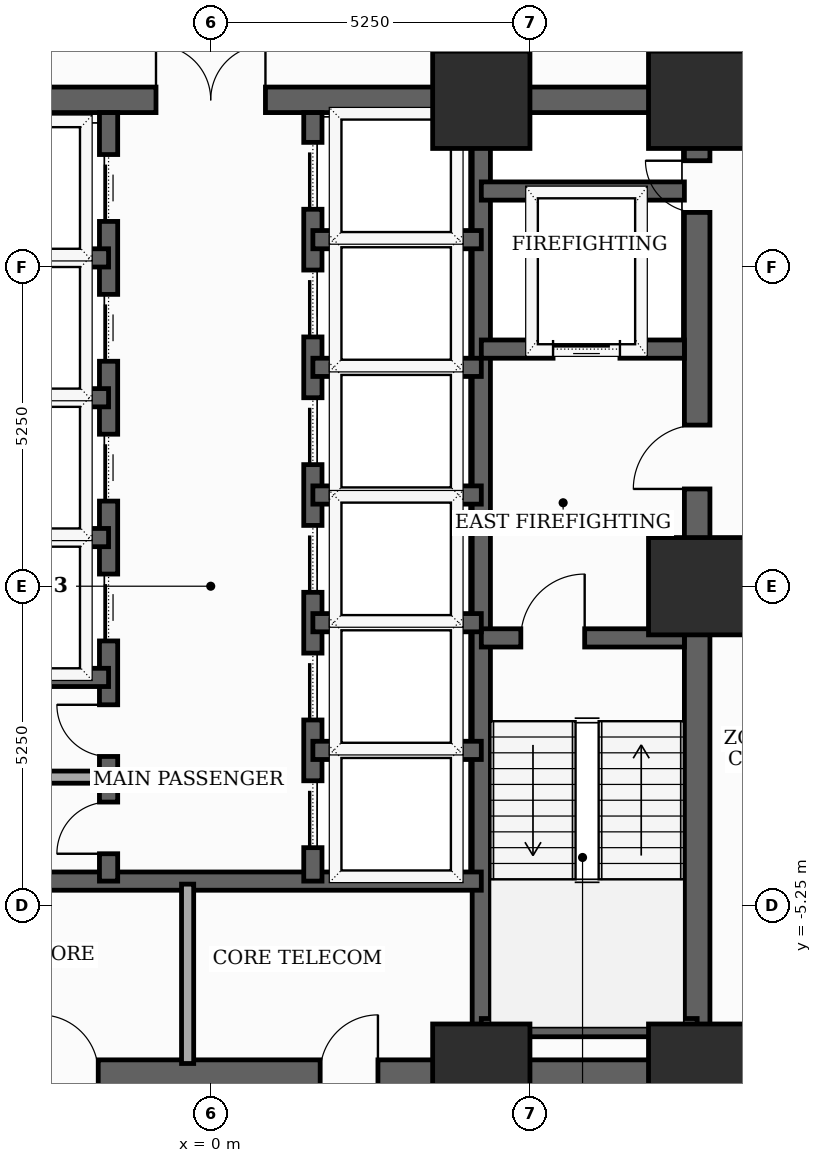
"""IFC4 building model, lengths in metres.
Left out: names, types, materials, properties, quantities, classifications, styles, units other than length and angle.
Written with IfcOpenShell. Run it as: python <this file> out.ifc"""

import sys

from ifc_helpers import new_model, si_unit, direction, frame, frame_2d, origin, origin_2d, place, context, subcontext, project, spatial, rectangle, extrude, element, fill, save


model = new_model("IFC4")
c1 = context("Model", 3, precision=1e-05, world=origin(), true_north=direction((0.0, 1.0)))
c2 = subcontext(c1, "Body", "Model", "MODEL_VIEW")
j1 = project(units=[si_unit("LENGTHUNIT", "METRE"), si_unit("PLANEANGLEUNIT", "RADIAN")], contexts=[c1])
p1 = place(None, origin())
s1 = spatial("IfcSite", under=j1, at=p1, CompositionType="ELEMENT")
p2 = place(p1, origin())
s2 = spatial("IfcBuilding", under=s1, at=p2, CompositionType="ELEMENT")
p3 = place(p2, frame((0.0, 0.0, 33.4)))
s3 = spatial("IfcBuildingStorey", under=s2, at=p3, CompositionType="ELEMENT", Elevation=33.4)
for number, where, z_axis, x_axis in (
    (1, (4.45, -8.0, 0.0), (0.0, 0.0, 1.0), (1.0, 0.0, 0.0)),
    (2, (8.0, -8.0, 0.0), (0.0, 0.0, 1.0), (1.0, 0.0, 0.0)),
    (3, (8.0, 0.0, 0.0), (0.0, 0.0, 1.0), (1.0, 0.0, 0.0)),
    (4, (8.0, 8.0, 0.0), (0.0, 0.0, 1.0), (1.0, 0.0, 0.0)),
    (5, (4.45, 8.0, 0.0), (0.0, 0.0, 1.0), (1.0, 0.0, 0.0)),
):
    element("IfcColumn", number, at=place(p3, frame(where, z_axis=z_axis, x_axis=x_axis)), inside=s3, PredefinedType="COLUMN", context=c2, shape_type="SweptSolid", body=[
        extrude(rectangle(XDim=1.6, YDim=1.6, at=origin_2d()), origin(), (0.0, 0.0, 1.0), 3.7),
    ])
p4 = place(p3, frame((8.0, -8.0, 0.0), z_axis=(0.0, 0.0, 1.0), x_axis=(0.0, 1.0, 0.0)))
e6 = element("IfcWall", 6, at=p4, inside=s3, PredefinedType="SHEAR", context=c2, shape_type="SweptSolid", body=[
    extrude(rectangle(XDim=16.0, YDim=0.42, at=frame_2d((8.0, 0.0))), origin(), (0.0, 0.0, 1.0), 3.5),
])
p5 = place(p4, frame((9.6, 0.0, 0.0)))
e7 = element("IfcOpeningElement", 7, at=p5, cuts=e6, PredefinedType="OPENING", context=c2, shape_type="SweptSolid", body=[
    extrude(rectangle(XDim=1.05, YDim=2.15, at=frame_2d((0.525, 1.075))), frame((0.0, 0.22, 0.0), z_axis=(0.0, -1.0, 0.0), x_axis=(1.0, 0.0, 0.0)), (0.0, 0.0, 1.0), 0.44),
])
p6 = place(p4, frame((14.148, 0.0, 0.0)))
e8 = element("IfcOpeningElement", 8, at=p6, cuts=e6, PredefinedType="OPENING", context=c2, shape_type="SweptSolid", body=[
    extrude(rectangle(XDim=0.85, YDim=2.02, at=frame_2d((0.425, 1.01))), frame((0.0, 0.22, 0.0), z_axis=(0.0, -1.0, 0.0), x_axis=(1.0, 0.0, 0.0)), (0.0, 0.0, 1.0), 0.44),
])
p7 = place(p3, frame((-8.0, -8.0, 0.0), z_axis=(0.0, 0.0, 1.0), x_axis=(1.0, 0.0, 0.0)))
e9 = element("IfcWall", 9, at=p7, inside=s3, PredefinedType="SHEAR", context=c2, shape_type="SweptSolid", body=[
    extrude(rectangle(XDim=16.0, YDim=0.42, at=frame_2d((8.0, 0.0))), origin(), (0.0, 0.0, 1.0), 3.5),
])
p8 = place(p7, frame((5.2, 0.0, 0.0)))
e10 = element("IfcOpeningElement", 10, at=p8, cuts=e9, PredefinedType="OPENING", context=c2, shape_type="SweptSolid", body=[
    extrude(rectangle(XDim=0.95, YDim=2.1, at=frame_2d((0.475, 1.05))), frame((0.0, 0.22, 0.0), z_axis=(0.0, -1.0, 0.0), x_axis=(1.0, 0.0, 0.0)), (0.0, 0.0, 1.0), 0.44),
])
p9 = place(p7, frame((9.8, 0.0, 0.0)))
e11 = element("IfcOpeningElement", 11, at=p9, cuts=e9, PredefinedType="OPENING", context=c2, shape_type="SweptSolid", body=[
    extrude(rectangle(XDim=0.95, YDim=2.1, at=frame_2d((0.475, 1.05))), frame((0.0, 0.22, 0.0), z_axis=(0.0, -1.0, 0.0), x_axis=(1.0, 0.0, 0.0)), (0.0, 0.0, 1.0), 0.44),
])
p10 = place(p3, frame((-8.0, 8.0, 0.0), z_axis=(0.0, 0.0, 1.0), x_axis=(1.0, 0.0, 0.0)))
e12 = element("IfcWall", 12, at=p10, inside=s3, PredefinedType="SHEAR", context=c2, shape_type="SweptSolid", body=[
    extrude(rectangle(XDim=16.0, YDim=0.42, at=frame_2d((8.0, 0.0))), origin(), (0.0, 0.0, 1.0), 3.5),
])
p11 = place(p10, frame((7.1, 0.0, 0.0)))
e13 = element("IfcOpeningElement", 13, at=p11, cuts=e12, PredefinedType="OPENING", context=c2, shape_type="SweptSolid", body=[
    extrude(rectangle(XDim=1.8, YDim=2.15, at=frame_2d((0.9, 1.075))), frame((0.0, 0.22, 0.0), z_axis=(0.0, -1.0, 0.0), x_axis=(1.0, 0.0, 0.0)), (0.0, 0.0, 1.0), 0.44),
])
p12 = place(p3, frame((4.45, -7.79, 0.0), z_axis=(0.0, 0.0, 1.0), x_axis=(0.0, 1.0, 0.0)))
e14 = element("IfcWall", 14, at=p12, inside=s3, PredefinedType="SHEAR", context=c2, shape_type="SweptSolid", body=[
    extrude(rectangle(XDim=15.58, YDim=0.3, at=frame_2d((7.79, 0.0))), origin(), (0.0, 0.0, 1.0), 3.5),
])
p13 = place(p3, frame((4.45, -0.85, 0.0), z_axis=(0.0, 0.0, 1.0), x_axis=(1.0, 0.0, 0.0)))
e15 = element("IfcWall", 15, at=p13, inside=s3, PredefinedType="SHEAR", context=c2, shape_type="SweptSolid", body=[
    extrude(rectangle(XDim=3.34, YDim=0.3, at=frame_2d((1.67, 0.0))), origin(), (0.0, 0.0, 1.0), 3.5),
])
p14 = place(p13, frame((0.65, 0.0, 0.0)))
e16 = element("IfcOpeningElement", 16, at=p14, cuts=e15, PredefinedType="OPENING", context=c2, shape_type="SweptSolid", body=[
    extrude(rectangle(XDim=1.05, YDim=2.15, at=frame_2d((0.525, 1.075))), frame((0.0, 0.16, 0.0), z_axis=(0.0, -1.0, 0.0), x_axis=(1.0, 0.0, 0.0)), (0.0, 0.0, 1.0), 0.32),
])
p15 = place(p3, frame((4.45, -7.26, 0.0), z_axis=(0.0, 0.0, 1.0), x_axis=(1.0, 0.0, 0.0)))
e17 = element("IfcWall", 17, at=p15, inside=s3, PredefinedType="SHEAR", context=c2, shape_type="SweptSolid", body=[
    extrude(rectangle(XDim=3.55, YDim=0.3, at=frame_2d((1.775, 0.0))), origin(), (0.0, 0.0, 1.0), 3.5),
])
p16 = place(p3, frame((4.45, 3.9, 0.0), z_axis=(0.0, 0.0, 1.0), x_axis=(1.0, 0.0, 0.0)))
e18 = element("IfcWall", 18, at=p16, inside=s3, PredefinedType="SHEAR", context=c2, shape_type="SweptSolid", body=[
    extrude(rectangle(XDim=3.34, YDim=0.3, at=frame_2d((1.67, 0.0))), origin(), (0.0, 0.0, 1.0), 3.5),
])
p17 = place(p16, frame((1.18, 0.0, 0.0)))
e19 = element("IfcOpeningElement", 19, at=p17, cuts=e18, PredefinedType="OPENING", context=c2, shape_type="SweptSolid", body=[
    extrude(rectangle(XDim=1.1, YDim=2.1, at=frame_2d((0.55, 1.05))), frame((0.0, 0.16, 0.0), z_axis=(0.0, -1.0, 0.0), x_axis=(1.0, 0.0, 0.0)), (0.0, 0.0, 1.0), 0.32),
])
p18 = place(p3, frame((4.45, 6.5, 0.0), z_axis=(0.0, 0.0, 1.0), x_axis=(1.0, 0.0, 0.0)))
e20 = element("IfcWall", 20, at=p18, inside=s3, PredefinedType="SHEAR", context=c2, shape_type="SweptSolid", body=[
    extrude(rectangle(XDim=3.34, YDim=0.3, at=frame_2d((1.67, 0.0))), origin(), (0.0, 0.0, 1.0), 3.5),
])
p19 = place(p3, frame((-4.45, -4.85, 0.0), z_axis=(0.0, 0.0, 1.0), x_axis=(1.0, 0.0, 0.0)))
e21 = element("IfcWall", 21, at=p19, inside=s3, PredefinedType="SHEAR", context=c2, shape_type="SweptSolid", body=[
    extrude(rectangle(XDim=8.9, YDim=0.3, at=frame_2d((4.45, 0.0))), origin(), (0.0, 0.0, 1.0), 3.5),
])
p20 = place(p3, frame((-1.68, -4.85, 0.0), z_axis=(0.0, 0.0, 1.0), x_axis=(0.0, 1.0, 0.0)))
e22 = element("IfcWall", 22, at=p20, inside=s3, PredefinedType="SHEAR", context=c2, shape_type="SweptSolid", body=[
    extrude(rectangle(XDim=12.64, YDim=0.3, at=frame_2d((6.32, 0.0))), origin(), (0.0, 0.0, 1.0), 3.5),
])
p21 = place(p20, frame((3.95, 0.0, 0.0)))
e23 = element("IfcOpeningElement", 23, at=p21, cuts=e22, PredefinedType="OPENING", context=c2, shape_type="SweptSolid", body=[
    extrude(rectangle(XDim=1.1, YDim=2.1, at=frame_2d((0.55, 1.05))), frame((0.0, 0.16, 0.0), z_axis=(0.0, -1.0, 0.0), x_axis=(1.0, 0.0, 0.0)), (0.0, 0.0, 1.0), 0.32),
])
p22 = place(p20, frame((6.25, 0.0, 0.0)))
e24 = element("IfcOpeningElement", 24, at=p22, cuts=e22, PredefinedType="OPENING", context=c2, shape_type="SweptSolid", body=[
    extrude(rectangle(XDim=1.1, YDim=2.1, at=frame_2d((0.55, 1.05))), frame((0.0, 0.16, 0.0), z_axis=(0.0, -1.0, 0.0), x_axis=(1.0, 0.0, 0.0)), (0.0, 0.0, 1.0), 0.32),
])
p23 = place(p20, frame((8.55, 0.0, 0.0)))
e25 = element("IfcOpeningElement", 25, at=p23, cuts=e22, PredefinedType="OPENING", context=c2, shape_type="SweptSolid", body=[
    extrude(rectangle(XDim=1.1, YDim=2.1, at=frame_2d((0.55, 1.05))), frame((0.0, 0.16, 0.0), z_axis=(0.0, -1.0, 0.0), x_axis=(1.0, 0.0, 0.0)), (0.0, 0.0, 1.0), 0.32),
])
p24 = place(p20, frame((10.85, 0.0, 0.0)))
e26 = element("IfcOpeningElement", 26, at=p24, cuts=e22, PredefinedType="OPENING", context=c2, shape_type="SweptSolid", body=[
    extrude(rectangle(XDim=1.1, YDim=2.1, at=frame_2d((0.55, 1.05))), frame((0.0, 0.16, 0.0), z_axis=(0.0, -1.0, 0.0), x_axis=(1.0, 0.0, 0.0)), (0.0, 0.0, 1.0), 0.32),
])
p25 = place(p20, frame((0.45, 0.0, 0.0)))
e27 = element("IfcOpeningElement", 27, at=p25, cuts=e22, PredefinedType="OPENING", context=c2, shape_type="SweptSolid", body=[
    extrude(rectangle(XDim=0.85, YDim=2.02, at=frame_2d((0.425, 1.01))), frame((0.0, 0.16, 0.0), z_axis=(0.0, -1.0, 0.0), x_axis=(1.0, 0.0, 0.0)), (0.0, 0.0, 1.0), 0.32),
])
p26 = place(p20, frame((2.05, 0.0, 0.0)))
e28 = element("IfcOpeningElement", 28, at=p26, cuts=e22, PredefinedType="OPENING", context=c2, shape_type="SweptSolid", body=[
    extrude(rectangle(XDim=0.85, YDim=2.02, at=frame_2d((0.425, 1.01))), frame((0.0, 0.16, 0.0), z_axis=(0.0, -1.0, 0.0), x_axis=(1.0, 0.0, 0.0)), (0.0, 0.0, 1.0), 0.32),
])
p27 = place(p3, frame((1.68, -4.85, 0.0), z_axis=(0.0, 0.0, 1.0), x_axis=(0.0, 1.0, 0.0)))
e29 = element("IfcWall", 29, at=p27, inside=s3, PredefinedType="SHEAR", context=c2, shape_type="SweptSolid", body=[
    extrude(rectangle(XDim=12.64, YDim=0.3, at=frame_2d((6.32, 0.0))), origin(), (0.0, 0.0, 1.0), 3.5),
])
p28 = place(p27, frame((0.55, 0.0, 0.0)))
e30 = element("IfcOpeningElement", 30, at=p28, cuts=e29, PredefinedType="OPENING", context=c2, shape_type="SweptSolid", body=[
    extrude(rectangle(XDim=1.1, YDim=2.1, at=frame_2d((0.55, 1.05))), frame((0.0, 0.16, 0.0), z_axis=(0.0, -1.0, 0.0), x_axis=(1.0, 0.0, 0.0)), (0.0, 0.0, 1.0), 0.32),
])
p29 = place(p27, frame((2.65, 0.0, 0.0)))
e31 = element("IfcOpeningElement", 31, at=p29, cuts=e29, PredefinedType="OPENING", context=c2, shape_type="SweptSolid", body=[
    extrude(rectangle(XDim=1.1, YDim=2.1, at=frame_2d((0.55, 1.05))), frame((0.0, 0.16, 0.0), z_axis=(0.0, -1.0, 0.0), x_axis=(1.0, 0.0, 0.0)), (0.0, 0.0, 1.0), 0.32),
])
p30 = place(p27, frame((4.75, 0.0, 0.0)))
e32 = element("IfcOpeningElement", 32, at=p30, cuts=e29, PredefinedType="OPENING", context=c2, shape_type="SweptSolid", body=[
    extrude(rectangle(XDim=1.1, YDim=2.1, at=frame_2d((0.55, 1.05))), frame((0.0, 0.16, 0.0), z_axis=(0.0, -1.0, 0.0), x_axis=(1.0, 0.0, 0.0)), (0.0, 0.0, 1.0), 0.32),
])
p31 = place(p27, frame((6.85, 0.0, 0.0)))
e33 = element("IfcOpeningElement", 33, at=p31, cuts=e29, PredefinedType="OPENING", context=c2, shape_type="SweptSolid", body=[
    extrude(rectangle(XDim=1.1, YDim=2.1, at=frame_2d((0.55, 1.05))), frame((0.0, 0.16, 0.0), z_axis=(0.0, -1.0, 0.0), x_axis=(1.0, 0.0, 0.0)), (0.0, 0.0, 1.0), 0.32),
])
p32 = place(p27, frame((8.95, 0.0, 0.0)))
e34 = element("IfcOpeningElement", 34, at=p32, cuts=e29, PredefinedType="OPENING", context=c2, shape_type="SweptSolid", body=[
    extrude(rectangle(XDim=1.1, YDim=2.1, at=frame_2d((0.55, 1.05))), frame((0.0, 0.16, 0.0), z_axis=(0.0, -1.0, 0.0), x_axis=(1.0, 0.0, 0.0)), (0.0, 0.0, 1.0), 0.32),
])
p33 = place(p27, frame((11.05, 0.0, 0.0)))
e35 = element("IfcOpeningElement", 35, at=p33, cuts=e29, PredefinedType="OPENING", context=c2, shape_type="SweptSolid", body=[
    extrude(rectangle(XDim=1.1, YDim=2.1, at=frame_2d((0.55, 1.05))), frame((0.0, 0.16, 0.0), z_axis=(0.0, -1.0, 0.0), x_axis=(1.0, 0.0, 0.0)), (0.0, 0.0, 1.0), 0.32),
])
for number, where, z_axis, x_axis in (
    (36, (-4.45, -1.5, 0.0), (0.0, 0.0, 1.0), (1.0, 0.0, 0.0)),
    (37, (-4.45, 0.8, 0.0), (0.0, 0.0, 1.0), (1.0, 0.0, 0.0)),
    (38, (-4.45, 3.1, 0.0), (0.0, 0.0, 1.0), (1.0, 0.0, 0.0)),
    (39, (-4.45, 5.4, 0.0), (0.0, 0.0, 1.0), (1.0, 0.0, 0.0)),
    (40, (1.68, 1.5, 0.0), (0.0, 0.0, 1.0), (1.0, 0.0, 0.0)),
    (41, (1.68, 3.6, 0.0), (0.0, 0.0, 1.0), (1.0, 0.0, 0.0)),
    (42, (1.68, 5.7, 0.0), (0.0, 0.0, 1.0), (1.0, 0.0, 0.0)),
    (43, (1.68, -2.7, 0.0), (0.0, 0.0, 1.0), (1.0, 0.0, 0.0)),
    (44, (1.68, -0.6, 0.0), (0.0, 0.0, 1.0), (1.0, 0.0, 0.0)),
):
    element("IfcWall", number, at=place(p3, frame(where, z_axis=z_axis, x_axis=x_axis)), inside=s3, PredefinedType="SHEAR", context=c2, shape_type="SweptSolid", body=[
        extrude(rectangle(XDim=2.77, YDim=0.3, at=frame_2d((1.385, 0.0))), origin(), (0.0, 0.0, 1.0), 3.5),
    ])
p34 = place(p3, frame((-0.38, -7.85, 0.0), z_axis=(0.0, 0.0, 1.0), x_axis=(0.0, 1.0, 0.0)))
e45 = element("IfcWall", 45, at=p34, inside=s3, PredefinedType="SOLIDWALL", context=c2, shape_type="SweptSolid", body=[
    extrude(rectangle(XDim=2.95, YDim=0.2, at=frame_2d((1.475, 0.0))), origin(), (0.0, 0.0, 1.0), 2.885),
])
p35 = place(p3, frame((-4.4, -3.14, 0.0), z_axis=(0.0, 0.0, 1.0), x_axis=(1.0, 0.0, 0.0)))
e46 = element("IfcWall", 46, at=p35, inside=s3, PredefinedType="SOLIDWALL", context=c2, shape_type="SweptSolid", body=[
    extrude(rectangle(XDim=2.68, YDim=0.2, at=frame_2d((1.34, 0.0))), origin(), (0.0, 0.0, 1.0), 3.5),
])
p36 = place(p5, origin())
e47 = element("IfcDoor", 47, at=p36, inside=s3, OperationType="SINGLE_SWING_LEFT", PredefinedType="DOOR", context=c2, shape_type="SweptSolid", body=[
    extrude(rectangle(XDim=1.05, YDim=2.15, at=frame_2d((0.525, 1.075))), frame((0.0, 0.025, 0.0), z_axis=(0.0, -1.0, 0.0), x_axis=(1.0, 0.0, 0.0)), (0.0, 0.0, 1.0), 0.05),
])
fill(e7, e47)
p37 = place(p6, origin())
e48 = element("IfcDoor", 48, at=p37, inside=s3, OperationType="SINGLE_SWING_RIGHT", PredefinedType="TRAPDOOR", context=c2, shape_type="SweptSolid", body=[
    extrude(rectangle(XDim=0.85, YDim=2.02, at=frame_2d((0.425, 1.01))), frame((0.0, 0.025, 0.0), z_axis=(0.0, -1.0, 0.0), x_axis=(1.0, 0.0, 0.0)), (0.0, 0.0, 1.0), 0.05),
])
fill(e8, e48)
p38 = place(p8, origin())
e49 = element("IfcDoor", 49, at=p38, inside=s3, OperationType="SINGLE_SWING_LEFT", PredefinedType="DOOR", context=c2, shape_type="SweptSolid", body=[
    extrude(rectangle(XDim=0.95, YDim=2.1, at=frame_2d((0.475, 1.05))), frame((0.0, 0.025, 0.0), z_axis=(0.0, -1.0, 0.0), x_axis=(1.0, 0.0, 0.0)), (0.0, 0.0, 1.0), 0.05),
])
fill(e10, e49)
p39 = place(p9, origin())
e50 = element("IfcDoor", 50, at=p39, inside=s3, OperationType="SINGLE_SWING_RIGHT", PredefinedType="DOOR", context=c2, shape_type="SweptSolid", body=[
    extrude(rectangle(XDim=0.95, YDim=2.1, at=frame_2d((0.475, 1.05))), frame((0.0, 0.025, 0.0), z_axis=(0.0, -1.0, 0.0), x_axis=(1.0, 0.0, 0.0)), (0.0, 0.0, 1.0), 0.05),
])
fill(e11, e50)
p40 = place(p11, origin())
e51 = element("IfcDoor", 51, at=p40, inside=s3, OperationType="DOUBLE_DOOR_SINGLE_SWING", PredefinedType="DOOR", context=c2, shape_type="SweptSolid", body=[
    extrude(rectangle(XDim=1.8, YDim=2.15, at=frame_2d((0.9, 1.075))), frame((0.0, 0.025, 0.0), z_axis=(0.0, -1.0, 0.0), x_axis=(1.0, 0.0, 0.0)), (0.0, 0.0, 1.0), 0.05),
])
fill(e13, e51)
p41 = place(p14, origin())
e52 = element("IfcDoor", 52, at=p41, inside=s3, OperationType="SINGLE_SWING_RIGHT", PredefinedType="DOOR", context=c2, shape_type="SweptSolid", body=[
    extrude(rectangle(XDim=1.05, YDim=2.15, at=frame_2d((0.525, 1.075))), frame((0.0, 0.025, 0.0), z_axis=(0.0, -1.0, 0.0), x_axis=(1.0, 0.0, 0.0)), (0.0, 0.0, 1.0), 0.05),
])
fill(e16, e52)
p42 = place(p17, origin())
e53 = element("IfcDoor", 53, at=p42, inside=s3, OperationType="SLIDING_TO_LEFT", PredefinedType="DOOR", context=c2, shape_type="SweptSolid", body=[
    extrude(rectangle(XDim=1.1, YDim=2.1, at=frame_2d((0.55, 1.05))), frame((0.0, 0.025, 0.0), z_axis=(0.0, -1.0, 0.0), x_axis=(1.0, 0.0, 0.0)), (0.0, 0.0, 1.0), 0.05),
])
fill(e19, e53)
p43 = place(p21, origin())
e54 = element("IfcDoor", 54, at=p43, inside=s3, OperationType="SLIDING_TO_LEFT", PredefinedType="DOOR", context=c2, shape_type="SweptSolid", body=[
    extrude(rectangle(XDim=1.1, YDim=2.1, at=frame_2d((0.55, 1.05))), frame((0.0, 0.025, 0.0), z_axis=(0.0, -1.0, 0.0), x_axis=(1.0, 0.0, 0.0)), (0.0, 0.0, 1.0), 0.05),
])
fill(e23, e54)
p44 = place(p22, origin())
e55 = element("IfcDoor", 55, at=p44, inside=s3, OperationType="SLIDING_TO_LEFT", PredefinedType="DOOR", context=c2, shape_type="SweptSolid", body=[
    extrude(rectangle(XDim=1.1, YDim=2.1, at=frame_2d((0.55, 1.05))), frame((0.0, 0.025, 0.0), z_axis=(0.0, -1.0, 0.0), x_axis=(1.0, 0.0, 0.0)), (0.0, 0.0, 1.0), 0.05),
])
fill(e24, e55)
p45 = place(p23, origin())
e56 = element("IfcDoor", 56, at=p45, inside=s3, OperationType="SLIDING_TO_LEFT", PredefinedType="DOOR", context=c2, shape_type="SweptSolid", body=[
    extrude(rectangle(XDim=1.1, YDim=2.1, at=frame_2d((0.55, 1.05))), frame((0.0, 0.025, 0.0), z_axis=(0.0, -1.0, 0.0), x_axis=(1.0, 0.0, 0.0)), (0.0, 0.0, 1.0), 0.05),
])
fill(e25, e56)
p46 = place(p24, origin())
e57 = element("IfcDoor", 57, at=p46, inside=s3, OperationType="SLIDING_TO_LEFT", PredefinedType="DOOR", context=c2, shape_type="SweptSolid", body=[
    extrude(rectangle(XDim=1.1, YDim=2.1, at=frame_2d((0.55, 1.05))), frame((0.0, 0.025, 0.0), z_axis=(0.0, -1.0, 0.0), x_axis=(1.0, 0.0, 0.0)), (0.0, 0.0, 1.0), 0.05),
])
fill(e26, e57)
p47 = place(p25, origin())
e58 = element("IfcDoor", 58, at=p47, inside=s3, OperationType="SINGLE_SWING_LEFT", PredefinedType="TRAPDOOR", context=c2, shape_type="SweptSolid", body=[
    extrude(rectangle(XDim=0.85, YDim=2.02, at=frame_2d((0.425, 1.01))), frame((0.0, 0.025, 0.0), z_axis=(0.0, -1.0, 0.0), x_axis=(1.0, 0.0, 0.0)), (0.0, 0.0, 1.0), 0.05),
])
fill(e27, e58)
p48 = place(p26, origin())
e59 = element("IfcDoor", 59, at=p48, inside=s3, OperationType="SINGLE_SWING_RIGHT", PredefinedType="TRAPDOOR", context=c2, shape_type="SweptSolid", body=[
    extrude(rectangle(XDim=0.85, YDim=2.02, at=frame_2d((0.425, 1.01))), frame((0.0, 0.025, 0.0), z_axis=(0.0, -1.0, 0.0), x_axis=(1.0, 0.0, 0.0)), (0.0, 0.0, 1.0), 0.05),
])
fill(e28, e59)
p49 = place(p28, origin())
e60 = element("IfcDoor", 60, at=p49, inside=s3, OperationType="SLIDING_TO_LEFT", PredefinedType="DOOR", context=c2, shape_type="SweptSolid", body=[
    extrude(rectangle(XDim=1.1, YDim=2.1, at=frame_2d((0.55, 1.05))), frame((0.0, 0.025, 0.0), z_axis=(0.0, -1.0, 0.0), x_axis=(1.0, 0.0, 0.0)), (0.0, 0.0, 1.0), 0.05),
])
fill(e30, e60)
p50 = place(p29, origin())
e61 = element("IfcDoor", 61, at=p50, inside=s3, OperationType="SLIDING_TO_LEFT", PredefinedType="DOOR", context=c2, shape_type="SweptSolid", body=[
    extrude(rectangle(XDim=1.1, YDim=2.1, at=frame_2d((0.55, 1.05))), frame((0.0, 0.025, 0.0), z_axis=(0.0, -1.0, 0.0), x_axis=(1.0, 0.0, 0.0)), (0.0, 0.0, 1.0), 0.05),
])
fill(e31, e61)
p51 = place(p30, origin())
e62 = element("IfcDoor", 62, at=p51, inside=s3, OperationType="SLIDING_TO_LEFT", PredefinedType="DOOR", context=c2, shape_type="SweptSolid", body=[
    extrude(rectangle(XDim=1.1, YDim=2.1, at=frame_2d((0.55, 1.05))), frame((0.0, 0.025, 0.0), z_axis=(0.0, -1.0, 0.0), x_axis=(1.0, 0.0, 0.0)), (0.0, 0.0, 1.0), 0.05),
])
fill(e32, e62)
p52 = place(p31, origin())
e63 = element("IfcDoor", 63, at=p52, inside=s3, OperationType="SLIDING_TO_LEFT", PredefinedType="DOOR", context=c2, shape_type="SweptSolid", body=[
    extrude(rectangle(XDim=1.1, YDim=2.1, at=frame_2d((0.55, 1.05))), frame((0.0, 0.025, 0.0), z_axis=(0.0, -1.0, 0.0), x_axis=(1.0, 0.0, 0.0)), (0.0, 0.0, 1.0), 0.05),
])
fill(e33, e63)
p53 = place(p32, origin())
e64 = element("IfcDoor", 64, at=p53, inside=s3, OperationType="SLIDING_TO_LEFT", PredefinedType="DOOR", context=c2, shape_type="SweptSolid", body=[
    extrude(rectangle(XDim=1.1, YDim=2.1, at=frame_2d((0.55, 1.05))), frame((0.0, 0.025, 0.0), z_axis=(0.0, -1.0, 0.0), x_axis=(1.0, 0.0, 0.0)), (0.0, 0.0, 1.0), 0.05),
])
fill(e34, e64)
p54 = place(p33, origin())
e65 = element("IfcDoor", 65, at=p54, inside=s3, OperationType="SLIDING_TO_LEFT", PredefinedType="DOOR", context=c2, shape_type="SweptSolid", body=[
    extrude(rectangle(XDim=1.1, YDim=2.1, at=frame_2d((0.55, 1.05))), frame((0.0, 0.025, 0.0), z_axis=(0.0, -1.0, 0.0), x_axis=(1.0, 0.0, 0.0)), (0.0, 0.0, 1.0), 0.05),
])
fill(e35, e65)
save(model, sys.argv[1])
